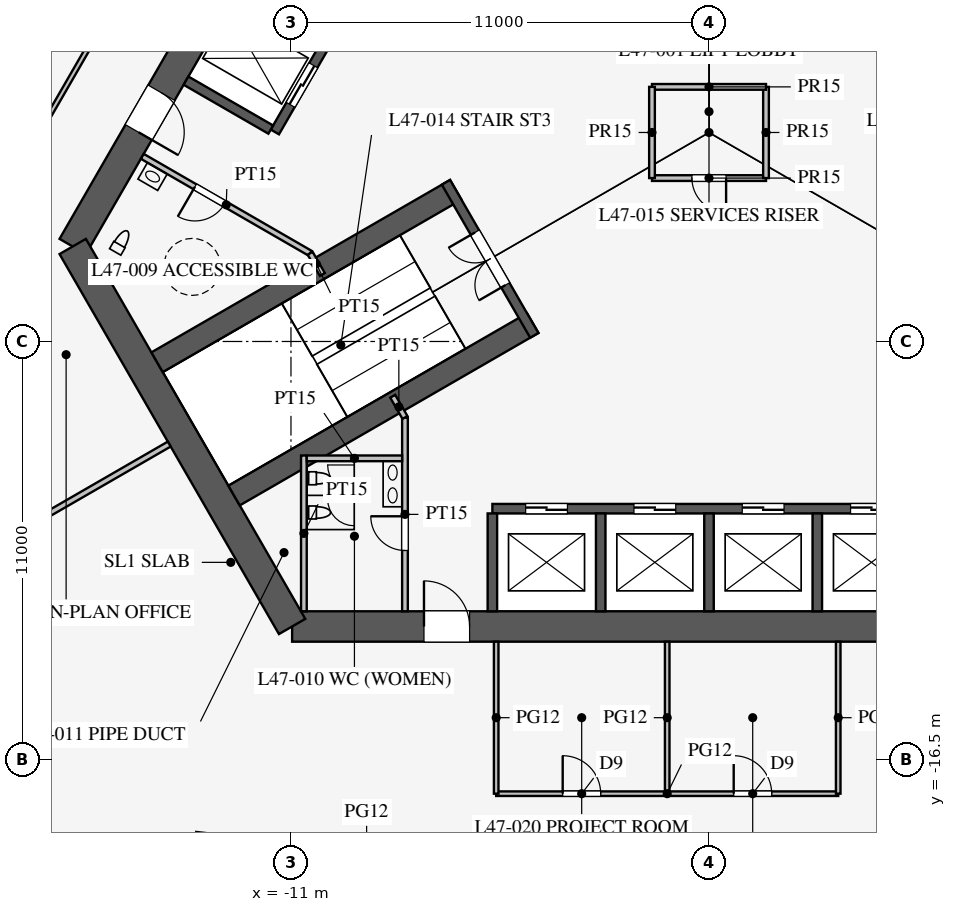
"""IFC4 building model, lengths in metres.
Left out: names, types, materials, properties, quantities, classifications, styles, units other than length and angle.
Written with IfcOpenShell. Run it as: python <this file> out.ifc"""

import sys

from ifc_helpers import new_model, si_unit, direction, frame, frame_2d, origin, place, context, subcontext, project, spatial, rectangle, extrude, element, fill, save


model = new_model("IFC4")
c1 = context("Model", 3, precision=1e-05, world=origin(), true_north=direction((0.0, 1.0)))
c2 = subcontext(c1, "Body", "Model", "MODEL_VIEW")
j1 = project(units=[si_unit("LENGTHUNIT", "METRE"), si_unit("PLANEANGLEUNIT", "RADIAN")], contexts=[c1])
p1 = place(None, origin())
s1 = spatial("IfcSite", under=j1, at=p1, CompositionType="ELEMENT")
p2 = place(p1, origin())
s2 = spatial("IfcBuilding", under=s1, at=p2, CompositionType="ELEMENT")
p3 = place(p2, frame((0.0, 0.0, 206.5)))
s3 = spatial("IfcBuildingStorey", under=s2, at=p3, CompositionType="ELEMENT", Elevation=206.5)
p4 = place(p3, frame((-10.97, -13.0, 0.0), z_axis=(0.0, 0.0, 1.0), x_axis=(1.0, 0.0, 0.0)))
e1 = element("IfcWall", 1, at=p4, inside=s3, PredefinedType="SHEAR", context=c2, shape_type="SweptSolid", body=[
    extrude(rectangle(XDim=21.939, YDim=0.8, at=frame_2d((10.97, 0.0))), origin(), (0.0, 0.0, 1.0), 4.2),
])
p5 = place(p4, frame((17.27, 0.0, 0.0)))
e2 = element("IfcOpeningElement", 2, at=p5, cuts=e1, PredefinedType="OPENING", context=c2, shape_type="SweptSolid", body=[
    extrude(rectangle(XDim=1.2, YDim=2.1, at=frame_2d((0.6, 1.05))), frame((0.0, 0.41, 0.0), z_axis=(0.0, -1.0, 0.0), x_axis=(1.0, 0.0, 0.0)), (0.0, 0.0, 1.0), 0.82),
])
p6 = place(p4, frame((3.47, 0.0, 0.0)))
e3 = element("IfcOpeningElement", 3, at=p6, cuts=e1, PredefinedType="OPENING", context=c2, shape_type="SweptSolid", body=[
    extrude(rectangle(XDim=1.2, YDim=2.1, at=frame_2d((0.6, 1.05))), frame((0.0, 0.41, 0.0), z_axis=(0.0, -1.0, 0.0), x_axis=(1.0, 0.0, 0.0)), (0.0, 0.0, 1.0), 0.82),
])
p7 = place(p3, frame((-5.773, 16.0, 0.0), z_axis=(0.0, 0.0, 1.0), x_axis=(-0.500002442456, -0.866023993627, 0.0)))
e4 = element("IfcWall", 4, at=p7, inside=s3, PredefinedType="SHEAR", context=c2, shape_type="SweptSolid", body=[
    extrude(rectangle(XDim=21.939, YDim=0.8, at=frame_2d((10.97, 0.0))), origin(), (0.0, 0.0, 1.0), 4.2),
])
p8 = place(p7, frame((17.27, 0.0, 0.0)))
e5 = element("IfcOpeningElement", 5, at=p8, cuts=e4, PredefinedType="OPENING", context=c2, shape_type="SweptSolid", body=[
    extrude(rectangle(XDim=1.2, YDim=2.1, at=frame_2d((0.6, 1.05))), frame((0.0, 0.41, 0.0), z_axis=(0.0, -1.0, 0.0), x_axis=(1.0, 0.0, 0.0)), (0.0, 0.0, 1.0), 0.82),
])
p9 = place(p7, frame((3.47, 0.0, 0.0)))
e6 = element("IfcOpeningElement", 6, at=p9, cuts=e4, PredefinedType="OPENING", context=c2, shape_type="SweptSolid", body=[
    extrude(rectangle(XDim=1.2, YDim=2.1, at=frame_2d((0.6, 1.05))), frame((0.0, 0.41, 0.0), z_axis=(0.0, -1.0, 0.0), x_axis=(1.0, 0.0, 0.0)), (0.0, 0.0, 1.0), 0.82),
])
p10 = place(p3, frame((-16.743, -3.0, 0.0), z_axis=(0.0, 0.0, 1.0), x_axis=(0.499995765644, -0.866027848477, 0.0)))
e7 = element("IfcWall", 7, at=p10, inside=s3, PredefinedType="SHEAR", context=c2, shape_type="SweptSolid", body=[
    extrude(rectangle(XDim=11.547, YDim=0.8, at=frame_2d((5.773, 0.0))), origin(), (0.0, 0.0, 1.0), 4.2),
])
p11 = place(p3, frame((-5.7, -9.9, 0.0), z_axis=(0.0, 0.0, 1.0), x_axis=(1.0, 0.0, 0.0)))
e8 = element("IfcWall", 8, at=p11, inside=s3, PredefinedType="SHEAR", context=c2, shape_type="SweptSolid", body=[
    extrude(rectangle(XDim=11.4, YDim=0.25, at=frame_2d((5.7, 0.0))), origin(), (0.0, 0.0, 1.0), 4.2),
])
p12 = place(p11, frame((0.875, 0.0, 0.0)))
e9 = element("IfcOpeningElement", 9, at=p12, cuts=e8, PredefinedType="OPENING", context=c2, shape_type="SweptSolid", body=[
    extrude(rectangle(XDim=1.1, YDim=2.2, at=frame_2d((0.55, 1.1))), frame((0.0, 0.135, 0.0), z_axis=(0.0, -1.0, 0.0), x_axis=(1.0, 0.0, 0.0)), (0.0, 0.0, 1.0), 0.27),
])
p13 = place(p11, frame((3.725, 0.0, 0.0)))
e10 = element("IfcOpeningElement", 10, at=p13, cuts=e8, PredefinedType="OPENING", context=c2, shape_type="SweptSolid", body=[
    extrude(rectangle(XDim=1.1, YDim=2.2, at=frame_2d((0.55, 1.1))), frame((0.0, 0.135, 0.0), z_axis=(0.0, -1.0, 0.0), x_axis=(1.0, 0.0, 0.0)), (0.0, 0.0, 1.0), 0.27),
])
p14 = place(p11, frame((6.575, 0.0, 0.0)))
e11 = element("IfcOpeningElement", 11, at=p14, cuts=e8, PredefinedType="OPENING", context=c2, shape_type="SweptSolid", body=[
    extrude(rectangle(XDim=1.1, YDim=2.2, at=frame_2d((0.55, 1.1))), frame((0.0, 0.135, 0.0), z_axis=(0.0, -1.0, 0.0), x_axis=(1.0, 0.0, 0.0)), (0.0, 0.0, 1.0), 0.27),
])
p15 = place(p11, frame((9.425, 0.0, 0.0)))
e12 = element("IfcOpeningElement", 12, at=p15, cuts=e8, PredefinedType="OPENING", context=c2, shape_type="SweptSolid", body=[
    extrude(rectangle(XDim=1.1, YDim=2.2, at=frame_2d((0.55, 1.1))), frame((0.0, 0.135, 0.0), z_axis=(0.0, -1.0, 0.0), x_axis=(1.0, 0.0, 0.0)), (0.0, 0.0, 1.0), 0.27),
])
for number, where, z_axis, x_axis in (
    (13, (-5.7, -10.025, 0.0), (0.0, 0.0, 1.0), (0.0, -1.0, 0.0)),
    (14, (-2.85, -10.025, 0.0), (0.0, 0.0, 1.0), (0.0, -1.0, 0.0)),
    (15, (0.0, -10.025, 0.0), (0.0, 0.0, 1.0), (0.0, -1.0, 0.0)),
    (16, (2.85, -10.025, 0.0), (0.0, 0.0, 1.0), (0.0, -1.0, 0.0)),
):
    element("IfcWall", number, at=place(p3, frame(where, z_axis=z_axis, x_axis=x_axis)), inside=s3, PredefinedType="SHEAR", context=c2, shape_type="SweptSolid", body=[
        extrude(rectangle(XDim=2.575, YDim=0.25, at=frame_2d((1.288, 0.0))), origin(), (0.0, 0.0, 1.0), 4.2),
    ])
p16 = place(p3, frame((-5.724, 9.886, 0.0), z_axis=(0.0, 0.0, 1.0), x_axis=(-0.500001763848, -0.866024385424, 0.0)))
e17 = element("IfcWall", 17, at=p16, inside=s3, PredefinedType="SHEAR", context=c2, shape_type="SweptSolid", body=[
    extrude(rectangle(XDim=11.4, YDim=0.25, at=frame_2d((5.7, 0.0))), origin(), (0.0, 0.0, 1.0), 4.2),
])
p17 = place(p16, frame((6.525, 0.0, 0.0)))
e18 = element("IfcOpeningElement", 18, at=p17, cuts=e17, PredefinedType="OPENING", context=c2, shape_type="SweptSolid", body=[
    extrude(rectangle(XDim=1.2, YDim=2.2, at=frame_2d((0.6, 1.1))), frame((0.0, 0.135, 0.0), z_axis=(0.0, -1.0, 0.0), x_axis=(1.0, 0.0, 0.0)), (0.0, 0.0, 1.0), 0.27),
])
p18 = place(p16, frame((9.375, 0.0, 0.0)))
e19 = element("IfcOpeningElement", 19, at=p18, cuts=e17, PredefinedType="OPENING", context=c2, shape_type="SweptSolid", body=[
    extrude(rectangle(XDim=1.2, YDim=2.2, at=frame_2d((0.6, 1.1))), frame((0.0, 0.135, 0.0), z_axis=(0.0, -1.0, 0.0), x_axis=(1.0, 0.0, 0.0)), (0.0, 0.0, 1.0), 0.27),
])
p19 = place(p3, frame((-11.532, 0.076, 0.0), z_axis=(0.0, 0.0, 1.0), x_axis=(-0.866005588531, 0.500034319456, 0.0)))
e20 = element("IfcWall", 20, at=p19, inside=s3, PredefinedType="SHEAR", context=c2, shape_type="SweptSolid", body=[
    extrude(rectangle(XDim=2.575, YDim=0.25, at=frame_2d((1.288, 0.0))), origin(), (0.0, 0.0, 1.0), 4.2),
])
for number, where, z_axis, x_axis in (
    (21, (-6.663, -1.509, 0.0), (0.0, 0.0, 1.0), (-0.866, -0.5, 0.0)),
    (22, (-4.638, -5.016, 0.0), (0.0, 0.0, 1.0), (-0.866, -0.5, 0.0)),
):
    element("IfcWall", number, at=place(p3, frame(where, z_axis=z_axis, x_axis=x_axis)), inside=s3, PredefinedType="SHEAR", context=c2, shape_type="SweptSolid", body=[
        extrude(rectangle(XDim=9.075, YDim=0.6, at=frame_2d((4.538, 0.0))), origin(), (0.0, 0.0, 1.0), 4.2),
    ])
p20 = place(p3, frame((-6.922, -1.312, 0.0), z_axis=(0.0, 0.0, 1.0), x_axis=(0.499984536904, -0.866034331223, 0.0)))
e23 = element("IfcWall", 23, at=p20, inside=s3, PredefinedType="SHEAR", context=c2, shape_type="SweptSolid", body=[
    extrude(rectangle(XDim=4.65, YDim=0.25, at=frame_2d((2.325, 0.0))), origin(), (0.0, 0.0, 1.0), 4.2),
])
p21 = place(p20, frame((1.525, 0.0, 0.0)))
e24 = element("IfcOpeningElement", 24, at=p21, cuts=e23, PredefinedType="OPENING", context=c2, shape_type="SweptSolid", body=[
    extrude(rectangle(XDim=1.6, YDim=2.1, at=frame_2d((0.8, 1.05))), frame((0.0, 0.135, 0.0), z_axis=(0.0, -1.0, 0.0), x_axis=(1.0, 0.0, 0.0)), (0.0, 0.0, 1.0), 0.27),
])
p22 = place(p3, frame((-8.0, -7.5, 0.0), z_axis=(0.0, 0.0, 1.0), x_axis=(0.0, -1.0, 0.0)))
e25 = element("IfcWall", 25, at=p22, inside=s3, PredefinedType="PARTITIONING", context=c2, shape_type="SweptSolid", body=[
    extrude(rectangle(XDim=5.1, YDim=0.15, at=frame_2d((2.55, 0.0))), origin(), (0.0, 0.0, 1.0), 4.0),
])
p23 = place(p22, frame((2.6, 0.0, 0.0)))
e26 = element("IfcOpeningElement", 26, at=p23, cuts=e25, PredefinedType="OPENING", context=c2, shape_type="SweptSolid", body=[
    extrude(rectangle(XDim=0.9, YDim=2.1, at=frame_2d((0.45, 1.05))), frame((0.0, 0.085, 0.0), z_axis=(0.0, -1.0, 0.0), x_axis=(1.0, 0.0, 0.0)), (0.0, 0.0, 1.0), 0.17),
])
p24 = place(p3, frame((-10.495, -3.178, 0.0), z_axis=(0.0, 0.0, 1.0), x_axis=(-0.86602216432, 0.500005610874, 0.0)))
e27 = element("IfcWall", 27, at=p24, inside=s3, PredefinedType="PARTITIONING", context=c2, shape_type="SweptSolid", body=[
    extrude(rectangle(XDim=5.1, YDim=0.15, at=frame_2d((2.55, 0.0))), origin(), (0.0, 0.0, 1.0), 4.0),
])
p25 = place(p24, frame((2.6, 0.0, 0.0)))
e28 = element("IfcOpeningElement", 28, at=p25, cuts=e27, PredefinedType="OPENING", context=c2, shape_type="SweptSolid", body=[
    extrude(rectangle(XDim=0.9, YDim=2.1, at=frame_2d((0.45, 1.05))), frame((0.0, 0.085, 0.0), z_axis=(0.0, -1.0, 0.0), x_axis=(1.0, 0.0, 0.0)), (0.0, 0.0, 1.0), 0.17),
])
for number, where, z_axis, x_axis in (
    (29, (-10.495, -3.178, 0.0), (0.0, 0.0, 1.0), (0.5, -0.866, 0.0)),
    (30, (-8.0, -7.5, 0.0), (0.0, 0.0, 1.0), (-0.5, 0.866, 0.0)),
):
    element("IfcWall", number, at=place(p3, frame(where, z_axis=z_axis, x_axis=x_axis)), inside=s3, PredefinedType="PARTITIONING", context=c2, shape_type="SweptSolid", body=[
        extrude(rectangle(XDim=0.645, YDim=0.15, at=frame_2d((0.323, 0.0))), origin(), (0.0, 0.0, 1.0), 4.0),
    ])
p26 = place(p3, frame((-10.66, -8.5, 0.0), z_axis=(0.0, 0.0, 1.0), x_axis=(0.0, -1.0, 0.0)))
e31 = element("IfcWall", 31, at=p26, inside=s3, PredefinedType="PARTITIONING", context=c2, shape_type="SweptSolid", body=[
    extrude(rectangle(XDim=4.1, YDim=0.15, at=frame_2d((2.05, 0.0))), origin(), (0.0, 0.0, 1.0), 4.0),
])
p27 = place(p3, frame((-8.075, -8.575, 0.0), z_axis=(0.0, 0.0, 1.0), x_axis=(-1.0, 0.0, 0.0)))
e32 = element("IfcWall", 32, at=p27, inside=s3, PredefinedType="PARTITIONING", context=c2, shape_type="SweptSolid", body=[
    extrude(rectangle(XDim=2.51, YDim=0.15, at=frame_2d((1.255, 0.0))), origin(), (0.0, 0.0, 1.0), 4.0),
])
p28 = place(p3, frame((-1.5, -1.2, 0.0), z_axis=(0.0, 0.0, 1.0), x_axis=(1.0, 0.0, 0.0)))
e33 = element("IfcWall", 33, at=p28, inside=s3, PredefinedType="PARTITIONING", context=c2, shape_type="SweptSolid", body=[
    extrude(rectangle(XDim=3.0, YDim=0.15, at=frame_2d((1.5, 0.0))), origin(), (0.0, 0.0, 1.0), 4.0),
])
p29 = place(p28, frame((1.05, 0.0, 0.0)))
e34 = element("IfcOpeningElement", 34, at=p29, cuts=e33, PredefinedType="OPENING", context=c2, shape_type="SweptSolid", body=[
    extrude(rectangle(XDim=0.9, YDim=2.1, at=frame_2d((0.45, 1.05))), frame((0.0, 0.085, 0.0), z_axis=(0.0, -1.0, 0.0), x_axis=(1.0, 0.0, 0.0)), (0.0, 0.0, 1.0), 0.17),
])
p30 = place(p3, frame((1.5, -1.2, 0.0), z_axis=(0.0, 0.0, 1.0), x_axis=(0.0, 1.0, 0.0)))
e35 = element("IfcWall", 35, at=p30, inside=s3, PredefinedType="PARTITIONING", context=c2, shape_type="SweptSolid", body=[
    extrude(rectangle(XDim=2.4, YDim=0.15, at=frame_2d((1.2, 0.0))), origin(), (0.0, 0.0, 1.0), 4.0),
])
p31 = place(p3, frame((1.5, 1.2, 0.0), z_axis=(0.0, 0.0, 1.0), x_axis=(-1.0, 0.0, 0.0)))
e36 = element("IfcWall", 36, at=p31, inside=s3, PredefinedType="PARTITIONING", context=c2, shape_type="SweptSolid", body=[
    extrude(rectangle(XDim=3.0, YDim=0.15, at=frame_2d((1.5, 0.0))), origin(), (0.0, 0.0, 1.0), 4.0),
])
p32 = place(p3, frame((-1.5, 1.2, 0.0), z_axis=(0.0, 0.0, 1.0), x_axis=(0.0, -1.0, 0.0)))
e37 = element("IfcWall", 37, at=p32, inside=s3, PredefinedType="PARTITIONING", context=c2, shape_type="SweptSolid", body=[
    extrude(rectangle(XDim=2.4, YDim=0.15, at=frame_2d((1.2, 0.0))), origin(), (0.0, 0.0, 1.0), 4.0),
])
p33 = place(p3, frame((-14.203, -8.2, 0.0), z_axis=(0.0, 0.0, 1.0), x_axis=(-0.866021600284, -0.500006587798, 0.0)))
e38 = element("IfcWall", 38, at=p33, inside=s3, PredefinedType="PARTITIONING", context=c2, shape_type="SweptSolid", body=[
    extrude(rectangle(XDim=14.95, YDim=0.15, at=frame_2d((7.475, 0.0))), origin(), (0.0, 0.0, 1.0), 2.4),
])
p34 = place(p3, frame((-1.1, -17.4, 0.0), z_axis=(0.0, 0.0, 1.0), x_axis=(1.0, 0.0, 0.0)))
e39 = element("IfcWall", 39, at=p34, inside=s3, PredefinedType="PARTITIONING", context=c2, shape_type="SweptSolid", body=[
    extrude(rectangle(XDim=4.5, YDim=0.12, at=frame_2d((2.25, 0.0))), origin(), (0.0, 0.0, 1.0), 2.9),
])
p35 = place(p34, frame((1.75, 0.0, 0.15)))
e40 = element("IfcOpeningElement", 40, at=p35, cuts=e39, PredefinedType="OPENING", context=c2, shape_type="SweptSolid", body=[
    extrude(rectangle(XDim=1.0, YDim=2.1, at=frame_2d((0.5, 1.05))), frame((0.0, 0.07, 0.0), z_axis=(0.0, -1.0, 0.0), x_axis=(1.0, 0.0, 0.0)), (0.0, 0.0, 1.0), 0.14),
])
p36 = place(p3, frame((-5.6, -17.4, 0.0), z_axis=(0.0, 0.0, 1.0), x_axis=(1.0, 0.0, 0.0)))
e41 = element("IfcWall", 41, at=p36, inside=s3, PredefinedType="PARTITIONING", context=c2, shape_type="SweptSolid", body=[
    extrude(rectangle(XDim=4.5, YDim=0.12, at=frame_2d((2.25, 0.0))), origin(), (0.0, 0.0, 1.0), 2.9),
])
p37 = place(p36, frame((1.75, 0.0, 0.15)))
e42 = element("IfcOpeningElement", 42, at=p37, cuts=e41, PredefinedType="OPENING", context=c2, shape_type="SweptSolid", body=[
    extrude(rectangle(XDim=1.0, YDim=2.1, at=frame_2d((0.5, 1.05))), frame((0.0, 0.07, 0.0), z_axis=(0.0, -1.0, 0.0), x_axis=(1.0, 0.0, 0.0)), (0.0, 0.0, 1.0), 0.14),
])
for number, where, z_axis, x_axis in (
    (43, (3.4, -13.4, 0.0), (0.0, 0.0, 1.0), (0.0, -1.0, 0.0)),
    (44, (-1.1, -13.4, 0.0), (0.0, 0.0, 1.0), (0.0, -1.0, 0.0)),
    (45, (-5.6, -13.4, 0.0), (0.0, 0.0, 1.0), (0.0, -1.0, 0.0)),
):
    element("IfcWall", number, at=place(p3, frame(where, z_axis=z_axis, x_axis=x_axis)), inside=s3, PredefinedType="PARTITIONING", context=c2, shape_type="SweptSolid", body=[
        extrude(rectangle(XDim=4.0, YDim=0.12, at=frame_2d((2.0, 0.0))), origin(), (0.0, 0.0, 1.0), 2.9),
    ])
p38 = place(p3, frame((-0.016, 30.491, 0.0), z_axis=(0.0, 0.0, 1.0), x_axis=(-0.50000091641, -0.866024874695, 0.0)))
e46 = element("IfcWall", 46, at=p38, inside=s3, PredefinedType="PARTITIONING", context=c2, shape_type="SweptSolid", body=[
    extrude(rectangle(XDim=52.796, YDim=0.12, at=frame_2d((26.398, 0.0))), origin(), (0.0, 0.0, 1.0), 2.9),
])
p39 = place(p38, frame((10.2, 0.0, 0.15)))
e47 = element("IfcOpeningElement", 47, at=p39, cuts=e46, PredefinedType="OPENING", context=c2, shape_type="SweptSolid", body=[
    extrude(rectangle(XDim=1.8, YDim=2.1, at=frame_2d((0.9, 1.05))), frame((0.0, 0.07, 0.0), z_axis=(0.0, -1.0, 0.0), x_axis=(1.0, 0.0, 0.0)), (0.0, 0.0, 1.0), 0.14),
])
p40 = place(p38, frame((40.8, 0.0, 0.15)))
e48 = element("IfcOpeningElement", 48, at=p40, cuts=e46, PredefinedType="OPENING", context=c2, shape_type="SweptSolid", body=[
    extrude(rectangle(XDim=1.8, YDim=2.1, at=frame_2d((0.9, 1.05))), frame((0.0, 0.07, 0.0), z_axis=(0.0, -1.0, 0.0), x_axis=(1.0, 0.0, 0.0)), (0.0, 0.0, 1.0), 0.14),
])
p41 = place(p23, frame((0.9, 0.0, 0.0), z_axis=(0.0, 0.0, 1.0), x_axis=(-1.0, 0.0, 0.0)))
e49 = element("IfcDoor", 49, at=p41, inside=s3, OperationType="SINGLE_SWING_RIGHT", PredefinedType="DOOR", context=c2, shape_type="SweptSolid", body=[
    extrude(rectangle(XDim=0.9, YDim=2.1, at=frame_2d((0.45, 1.05))), frame((0.0, 0.025, 0.0), z_axis=(0.0, -1.0, 0.0), x_axis=(1.0, 0.0, 0.0)), (0.0, 0.0, 1.0), 0.05),
])
fill(e26, e49)
p42 = place(p25, origin())
e50 = element("IfcDoor", 50, at=p42, inside=s3, OperationType="SINGLE_SWING_RIGHT", PredefinedType="DOOR", context=c2, shape_type="SweptSolid", body=[
    extrude(rectangle(XDim=0.9, YDim=2.1, at=frame_2d((0.45, 1.05))), frame((0.0, 0.025, 0.0), z_axis=(0.0, -1.0, 0.0), x_axis=(1.0, 0.0, 0.0)), (0.0, 0.0, 1.0), 0.05),
])
fill(e28, e50)
p43 = place(p29, frame((0.9, 0.0, 0.0), z_axis=(0.0, 0.0, 1.0), x_axis=(-1.0, 0.0, 0.0)))
e51 = element("IfcDoor", 51, at=p43, inside=s3, OperationType="SINGLE_SWING_LEFT", PredefinedType="DOOR", context=c2, shape_type="SweptSolid", body=[
    extrude(rectangle(XDim=0.9, YDim=2.1, at=frame_2d((0.45, 1.05))), frame((0.0, 0.025, 0.0), z_axis=(0.0, -1.0, 0.0), x_axis=(1.0, 0.0, 0.0)), (0.0, 0.0, 1.0), 0.05),
])
fill(e34, e51)
p44 = place(p21, frame((1.6, 0.0, 0.0), z_axis=(0.0, 0.0, 1.0), x_axis=(-1.0, 0.0, 0.0)))
e52 = element("IfcDoor", 52, at=p44, inside=s3, OperationType="DOUBLE_DOOR_SINGLE_SWING", PredefinedType="DOOR", context=c2, shape_type="SweptSolid", body=[
    extrude(rectangle(XDim=1.6, YDim=2.1, at=frame_2d((0.8, 1.05))), frame((0.0, 0.025, 0.0), z_axis=(0.0, -1.0, 0.0), x_axis=(1.0, 0.0, 0.0)), (0.0, 0.0, 1.0), 0.05),
])
fill(e24, e52)
p45 = place(p6, origin())
e53 = element("IfcDoor", 53, at=p45, inside=s3, OperationType="SINGLE_SWING_LEFT", PredefinedType="DOOR", context=c2, shape_type="SweptSolid", body=[
    extrude(rectangle(XDim=1.2, YDim=2.1, at=frame_2d((0.6, 1.05))), frame((0.0, 0.025, 0.0), z_axis=(0.0, -1.0, 0.0), x_axis=(1.0, 0.0, 0.0)), (0.0, 0.0, 1.0), 0.05),
])
fill(e3, e53)
p46 = place(p8, origin())
e54 = element("IfcDoor", 54, at=p46, inside=s3, OperationType="SINGLE_SWING_RIGHT", PredefinedType="DOOR", context=c2, shape_type="SweptSolid", body=[
    extrude(rectangle(XDim=1.2, YDim=2.1, at=frame_2d((0.6, 1.05))), frame((0.0, 0.025, 0.0), z_axis=(0.0, -1.0, 0.0), x_axis=(1.0, 0.0, 0.0)), (0.0, 0.0, 1.0), 0.05),
])
fill(e5, e54)
p47 = place(p37, origin())
e55 = element("IfcDoor", 55, at=p47, inside=s3, OperationType="SINGLE_SWING_LEFT", PredefinedType="DOOR", context=c2, shape_type="SweptSolid", body=[
    extrude(rectangle(XDim=1.0, YDim=2.1, at=frame_2d((0.5, 1.05))), frame((0.0, 0.025, 0.0), z_axis=(0.0, -1.0, 0.0), x_axis=(1.0, 0.0, 0.0)), (0.0, 0.0, 1.0), 0.05),
])
fill(e42, e55)
p48 = place(p35, origin())
e56 = element("IfcDoor", 56, at=p48, inside=s3, OperationType="SINGLE_SWING_LEFT", PredefinedType="DOOR", context=c2, shape_type="SweptSolid", body=[
    extrude(rectangle(XDim=1.0, YDim=2.1, at=frame_2d((0.5, 1.05))), frame((0.0, 0.025, 0.0), z_axis=(0.0, -1.0, 0.0), x_axis=(1.0, 0.0, 0.0)), (0.0, 0.0, 1.0), 0.05),
])
fill(e40, e56)
p49 = place(p12, origin())
e57 = element("IfcDoor", 57, at=p49, inside=s3, OperationType="DOUBLE_DOOR_SLIDING", PredefinedType="DOOR", context=c2, shape_type="SweptSolid", body=[
    extrude(rectangle(XDim=1.1, YDim=2.2, at=frame_2d((0.55, 1.1))), frame((0.0, 0.025, 0.0), z_axis=(0.0, -1.0, 0.0), x_axis=(1.0, 0.0, 0.0)), (0.0, 0.0, 1.0), 0.05),
])
fill(e9, e57)
p50 = place(p13, origin())
e58 = element("IfcDoor", 58, at=p50, inside=s3, OperationType="DOUBLE_DOOR_SLIDING", PredefinedType="DOOR", context=c2, shape_type="SweptSolid", body=[
    extrude(rectangle(XDim=1.1, YDim=2.2, at=frame_2d((0.55, 1.1))), frame((0.0, 0.025, 0.0), z_axis=(0.0, -1.0, 0.0), x_axis=(1.0, 0.0, 0.0)), (0.0, 0.0, 1.0), 0.05),
])
fill(e10, e58)
p51 = place(p14, origin())
e59 = element("IfcDoor", 59, at=p51, inside=s3, OperationType="DOUBLE_DOOR_SLIDING", PredefinedType="DOOR", context=c2, shape_type="SweptSolid", body=[
    extrude(rectangle(XDim=1.1, YDim=2.2, at=frame_2d((0.55, 1.1))), frame((0.0, 0.025, 0.0), z_axis=(0.0, -1.0, 0.0), x_axis=(1.0, 0.0, 0.0)), (0.0, 0.0, 1.0), 0.05),
])
fill(e11, e59)
p52 = place(p15, origin())
e60 = element("IfcDoor", 60, at=p52, inside=s3, OperationType="DOUBLE_DOOR_SLIDING", PredefinedType="DOOR", context=c2, shape_type="SweptSolid", body=[
    extrude(rectangle(XDim=1.1, YDim=2.2, at=frame_2d((0.55, 1.1))), frame((0.0, 0.025, 0.0), z_axis=(0.0, -1.0, 0.0), x_axis=(1.0, 0.0, 0.0)), (0.0, 0.0, 1.0), 0.05),
])
fill(e12, e60)
p53 = place(p18, origin())
e61 = element("IfcDoor", 61, at=p53, inside=s3, OperationType="DOUBLE_DOOR_SLIDING", PredefinedType="DOOR", context=c2, shape_type="SweptSolid", body=[
    extrude(rectangle(XDim=1.2, YDim=2.2, at=frame_2d((0.6, 1.1))), frame((0.0, 0.025, 0.0), z_axis=(0.0, -1.0, 0.0), x_axis=(1.0, 0.0, 0.0)), (0.0, 0.0, 1.0), 0.05),
])
fill(e19, e61)
save(model, sys.argv[1])
